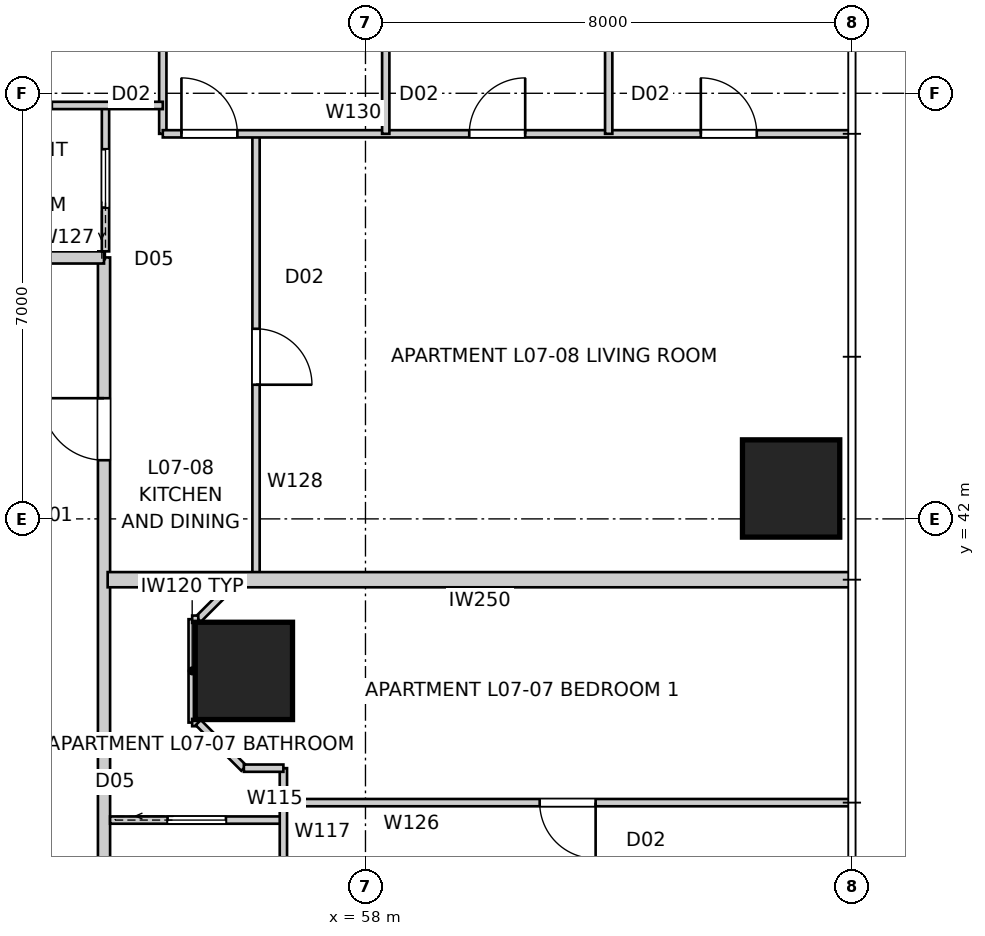
"""IFC4 building model, lengths in metres.
Left out: names, types, materials, properties, quantities, classifications, styles, units other than length and angle.
Written with IfcOpenShell. Run it as: python <this file> out.ifc"""

import sys

from ifc_helpers import new_model, si_unit, direction, frame, frame_2d, origin, origin_2d, place, context, subcontext, project, spatial, rectangle, extrude, element, fill, save


model = new_model("IFC4")
c1 = context("Model", 3, precision=1e-05, world=origin(), true_north=direction((0.0, 1.0)))
c2 = subcontext(c1, "Body", "Model", "MODEL_VIEW")
j1 = project(units=[si_unit("LENGTHUNIT", "METRE"), si_unit("PLANEANGLEUNIT", "RADIAN")], contexts=[c1])
p1 = place(None, origin())
s1 = spatial("IfcSite", under=j1, at=p1, CompositionType="ELEMENT")
p2 = place(p1, origin())
s2 = spatial("IfcBuilding", under=s1, at=p2, CompositionType="ELEMENT")
p3 = place(p2, frame((0.0, 0.0, 28.6)))
s3 = spatial("IfcBuildingStorey", under=s2, at=p3, CompositionType="ELEMENT", Elevation=28.6)
for number, where, z_axis, x_axis in (
    (1, (65.0, 42.5, 0.0), (0.0, 0.0, 1.0), (1.0, 0.0, 0.0)),
    (2, (56.0, 39.5, 0.0), (0.0, 0.0, 1.0), (1.0, 0.0, 0.0)),
):
    element("IfcColumn", number, at=place(p3, frame(where, z_axis=z_axis, x_axis=x_axis)), inside=s3, PredefinedType="COLUMN", context=c2, shape_type="SweptSolid", body=[
        extrude(rectangle(XDim=1.6, YDim=1.6, at=origin_2d()), origin(), (0.0, 0.0, 1.0), 3.4),
    ])
p4 = place(p3, frame((53.7, 13.7, 0.0), z_axis=(0.0, 0.0, 1.0), x_axis=(0.0, 1.0, 0.0)))
e3 = element("IfcWall", 3, at=p4, inside=s3, PredefinedType="PARTITIONING", context=c2, shape_type="SweptSolid", body=[
    extrude(rectangle(XDim=32.6, YDim=0.2, at=frame_2d((16.3, 0.0))), origin(), (0.0, 0.0, 1.0), 3.25),
])
p5 = place(p4, frame((2.315, 0.0, 0.0)))
e4 = element("IfcOpeningElement", 4, at=p5, cuts=e3, PredefinedType="OPENING", context=c2, shape_type="SweptSolid", body=[
    extrude(rectangle(XDim=1.02, YDim=2.34, at=frame_2d((0.51, 1.17))), frame((0.0, 0.11, 0.0), z_axis=(0.0, -1.0, 0.0), x_axis=(1.0, 0.0, 0.0)), (0.0, 0.0, 1.0), 0.22),
])
p6 = place(p4, frame((29.265, 0.0, 0.0)))
e5 = element("IfcOpeningElement", 5, at=p6, cuts=e3, PredefinedType="OPENING", context=c2, shape_type="SweptSolid", body=[
    extrude(rectangle(XDim=1.02, YDim=2.34, at=frame_2d((0.51, 1.17))), frame((0.0, 0.11, 0.0), z_axis=(0.0, -1.0, 0.0), x_axis=(1.0, 0.0, 0.0)), (0.0, 0.0, 1.0), 0.22),
])
p7 = place(p4, frame((20.646, 0.0, 0.0)))
e6 = element("IfcOpeningElement", 6, at=p7, cuts=e3, PredefinedType="OPENING", context=c2, shape_type="SweptSolid", body=[
    extrude(rectangle(XDim=1.02, YDim=2.34, at=frame_2d((0.51, 1.17))), frame((0.0, 0.11, 0.0), z_axis=(0.0, -1.0, 0.0), x_axis=(1.0, 0.0, 0.0)), (0.0, 0.0, 1.0), 0.22),
])
p8 = place(p4, frame((13.626, 0.0, 0.0)))
e7 = element("IfcOpeningElement", 7, at=p8, cuts=e3, PredefinedType="OPENING", context=c2, shape_type="SweptSolid", body=[
    extrude(rectangle(XDim=1.02, YDim=2.34, at=frame_2d((0.51, 1.17))), frame((0.0, 0.11, 0.0), z_axis=(0.0, -1.0, 0.0), x_axis=(1.0, 0.0, 0.0)), (0.0, 0.0, 1.0), 0.22),
])
p9 = place(p3, frame((53.7, 46.3, 0.0), z_axis=(0.0, 0.0, 1.0), x_axis=(-1.0, 0.0, 0.0)))
e8 = element("IfcWall", 8, at=p9, inside=s3, PredefinedType="PARTITIONING", context=c2, shape_type="SweptSolid", body=[
    extrude(rectangle(XDim=4.458, YDim=0.2, at=frame_2d((2.229, 0.0))), origin(), (0.0, 0.0, 1.0), 3.25),
])
p10 = place(p3, frame((66.0, 41.0, 0.0), z_axis=(0.0, 0.0, 1.0), x_axis=(-1.0, 0.0, 0.0)))
e9 = element("IfcWall", 9, at=p10, inside=s3, PredefinedType="PARTITIONING", context=c2, shape_type="SweptSolid", body=[
    extrude(rectangle(XDim=12.24, YDim=0.25, at=frame_2d((6.12, 0.0))), origin(), (0.0, 0.0, 1.0), 3.25),
])
p11 = place(p3, frame((53.8, 37.046, 0.0), z_axis=(0.0, 0.0, 1.0), x_axis=(1.0, 0.0, 0.0)))
e10 = element("IfcWall", 10, at=p11, inside=s3, PredefinedType="PARTITIONING", context=c2, shape_type="SweptSolid", body=[
    extrude(rectangle(XDim=2.85, YDim=0.12, at=frame_2d((1.425, 0.0))), origin(), (0.0, 0.0, 1.0), 3.25),
])
p12 = place(p11, frame((0.945, 0.0, 0.0)))
e11 = element("IfcOpeningElement", 11, at=p12, cuts=e10, PredefinedType="OPENING", context=c2, shape_type="SweptSolid", body=[
    extrude(rectangle(XDim=0.96, YDim=2.1, at=frame_2d((0.48, 1.05))), frame((0.0, 0.07, 0.0), z_axis=(0.0, -1.0, 0.0), x_axis=(1.0, 0.0, 0.0)), (0.0, 0.0, 1.0), 0.14),
])
p13 = place(p3, frame((56.65, 37.9, 0.0), z_axis=(0.0, 0.0, 1.0), x_axis=(0.0, -1.0, 0.0)))
e12 = element("IfcWall", 12, at=p13, inside=s3, PredefinedType="PARTITIONING", context=c2, shape_type="SweptSolid", body=[
    extrude(rectangle(XDim=5.234, YDim=0.12, at=frame_2d((2.617, 0.0))), origin(), (0.0, 0.0, 1.0), 2.55),
])
p14 = place(p13, frame((2.109, 0.0, 0.0)))
e13 = element("IfcOpeningElement", 13, at=p14, cuts=e12, PredefinedType="OPENING", context=c2, shape_type="SweptSolid", body=[
    extrude(rectangle(XDim=0.92, YDim=2.34, at=frame_2d((0.46, 1.17))), frame((0.0, 0.07, 0.0), z_axis=(0.0, -1.0, 0.0), x_axis=(1.0, 0.0, 0.0)), (0.0, 0.0, 1.0), 0.14),
])
p15 = place(p3, frame((55.9, 41.0, 0.0), z_axis=(0.0, 0.0, 1.0), x_axis=(-0.707106781187, -0.707106781187, 0.0)))
e14 = element("IfcWall", 14, at=p15, inside=s3, PredefinedType="PARTITIONING", context=c2, shape_type="SweptSolid", body=[
    extrude(rectangle(XDim=0.919, YDim=0.12, at=frame_2d((0.459, 0.0))), origin(), (0.0, 0.0, 1.0), 3.25),
])
p16 = place(p3, frame((55.15, 40.35, 0.0), z_axis=(0.0, 0.0, 1.0), x_axis=(0.0, -1.0, 0.0)))
e15 = element("IfcWall", 15, at=p16, inside=s3, PredefinedType="PARTITIONING", context=c2, shape_type="SweptSolid", body=[
    extrude(rectangle(XDim=1.7, YDim=0.12, at=frame_2d((0.85, 0.0))), origin(), (0.0, 0.0, 1.0), 3.25),
])
p17 = place(p3, frame((55.25, 38.65, 0.0), z_axis=(0.0, 0.0, 1.0), x_axis=(0.707106781187, -0.707106781187, 0.0)))
e16 = element("IfcWall", 16, at=p17, inside=s3, PredefinedType="PARTITIONING", context=c2, shape_type="SweptSolid", body=[
    extrude(rectangle(XDim=1.061, YDim=0.12, at=frame_2d((0.53, 0.0))), origin(), (0.0, 0.0, 1.0), 3.25),
])
p18 = place(p3, frame((56.0, 37.9, 0.0), z_axis=(0.0, 0.0, 1.0), x_axis=(1.0, 0.0, 0.0)))
e17 = element("IfcWall", 17, at=p18, inside=s3, PredefinedType="PARTITIONING", context=c2, shape_type="SweptSolid", body=[
    extrude(rectangle(XDim=0.65, YDim=0.12, at=frame_2d((0.325, 0.0))), origin(), (0.0, 0.0, 1.0), 3.25),
])
p19 = place(p3, frame((65.96, 37.333, 0.0), z_axis=(0.0, 0.0, 1.0), x_axis=(-1.0, 0.0, 0.0)))
e18 = element("IfcWall", 18, at=p19, inside=s3, PredefinedType="PARTITIONING", context=c2, shape_type="SweptSolid", body=[
    extrude(rectangle(XDim=9.31, YDim=0.12, at=frame_2d((4.655, 0.0))), origin(), (0.0, 0.0, 1.0), 3.25),
])
p20 = place(p19, frame((4.175, 0.0, 0.0)))
e19 = element("IfcOpeningElement", 19, at=p20, cuts=e18, PredefinedType="OPENING", context=c2, shape_type="SweptSolid", body=[
    extrude(rectangle(XDim=0.92, YDim=2.34, at=frame_2d((0.46, 1.17))), frame((0.0, 0.07, 0.0), z_axis=(0.0, -1.0, 0.0), x_axis=(1.0, 0.0, 0.0)), (0.0, 0.0, 1.0), 0.14),
])
p21 = place(p3, frame((53.724, 46.4, 0.0), z_axis=(0.0, 0.0, 1.0), x_axis=(0.0, 1.0, 0.0)))
e20 = element("IfcWall", 20, at=p21, inside=s3, PredefinedType="PARTITIONING", context=c2, shape_type="SweptSolid", body=[
    extrude(rectangle(XDim=2.4, YDim=0.12, at=frame_2d((1.2, 0.0))), origin(), (0.0, 0.0, 1.0), 3.25),
])
p22 = place(p21, frame((0.72, 0.0, 0.0)))
e21 = element("IfcOpeningElement", 21, at=p22, cuts=e20, PredefinedType="OPENING", context=c2, shape_type="SweptSolid", body=[
    extrude(rectangle(XDim=0.96, YDim=2.1, at=frame_2d((0.48, 1.05))), frame((0.0, 0.07, 0.0), z_axis=(0.0, -1.0, 0.0), x_axis=(1.0, 0.0, 0.0)), (0.0, 0.0, 1.0), 0.14),
])
p23 = place(p3, frame((56.2, 48.333, 0.0), z_axis=(0.0, 0.0, 1.0), x_axis=(0.0, -1.0, 0.0)))
e22 = element("IfcWall", 22, at=p23, inside=s3, PredefinedType="PARTITIONING", context=c2, shape_type="SweptSolid", body=[
    extrude(rectangle(XDim=7.333, YDim=0.12, at=frame_2d((3.667, 0.0))), origin(), (0.0, 0.0, 1.0), 3.25),
])
p24 = place(p23, frame((3.207, 0.0, 0.0)))
e23 = element("IfcOpeningElement", 23, at=p24, cuts=e22, PredefinedType="OPENING", context=c2, shape_type="SweptSolid", body=[
    extrude(rectangle(XDim=0.92, YDim=2.34, at=frame_2d((0.46, 1.17))), frame((0.0, 0.07, 0.0), z_axis=(0.0, -1.0, 0.0), x_axis=(1.0, 0.0, 0.0)), (0.0, 0.0, 1.0), 0.14),
])
p25 = place(p3, frame((54.667, 55.96, 0.0), z_axis=(0.0, 0.0, 1.0), x_axis=(0.0, -1.0, 0.0)))
e24 = element("IfcWall", 24, at=p25, inside=s3, PredefinedType="PARTITIONING", context=c2, shape_type="SweptSolid", body=[
    extrude(rectangle(XDim=7.627, YDim=0.12, at=frame_2d((3.813, 0.0))), origin(), (0.0, 0.0, 1.0), 2.638),
])
p26 = place(p3, frame((54.667, 48.333, 0.0), z_axis=(0.0, 0.0, 1.0), x_axis=(1.0, 0.0, 0.0)))
e25 = element("IfcWall", 25, at=p26, inside=s3, PredefinedType="PARTITIONING", context=c2, shape_type="SweptSolid", body=[
    extrude(rectangle(XDim=11.293, YDim=0.12, at=frame_2d((5.646, 0.0))), origin(), (0.0, 0.0, 1.0), 3.25),
])
p27 = place(p26, frame((0.307, 0.0, 0.0)))
e26 = element("IfcOpeningElement", 26, at=p27, cuts=e25, PredefinedType="OPENING", context=c2, shape_type="SweptSolid", body=[
    extrude(rectangle(XDim=0.92, YDim=2.34, at=frame_2d((0.46, 1.17))), frame((0.0, 0.07, 0.0), z_axis=(0.0, -1.0, 0.0), x_axis=(1.0, 0.0, 0.0)), (0.0, 0.0, 1.0), 0.14),
])
p28 = place(p26, frame((8.848, 0.0, 0.0)))
e27 = element("IfcOpeningElement", 27, at=p28, cuts=e25, PredefinedType="OPENING", context=c2, shape_type="SweptSolid", body=[
    extrude(rectangle(XDim=0.92, YDim=2.34, at=frame_2d((0.46, 1.17))), frame((0.0, 0.07, 0.0), z_axis=(0.0, -1.0, 0.0), x_axis=(1.0, 0.0, 0.0)), (0.0, 0.0, 1.0), 0.14),
])
p29 = place(p26, frame((5.04, 0.0, 0.0)))
e28 = element("IfcOpeningElement", 28, at=p29, cuts=e25, PredefinedType="OPENING", context=c2, shape_type="SweptSolid", body=[
    extrude(rectangle(XDim=0.92, YDim=2.34, at=frame_2d((0.46, 1.17))), frame((0.0, 0.07, 0.0), z_axis=(0.0, -1.0, 0.0), x_axis=(1.0, 0.0, 0.0)), (0.0, 0.0, 1.0), 0.14),
])
p30 = place(p3, frame((25.333, 48.8, 0.0), z_axis=(0.0, 0.0, 1.0), x_axis=(1.0, 0.0, 0.0)))
e29 = element("IfcWall", 29, at=p30, inside=s3, PredefinedType="PARTITIONING", context=c2, shape_type="SweptSolid", body=[
    extrude(rectangle(XDim=29.333, YDim=0.12, at=frame_2d((14.667, 0.0))), origin(), (0.0, 0.0, 1.0), 3.25),
])
p31 = place(p30, frame((19.707, 0.0, 0.0)))
e30 = element("IfcOpeningElement", 30, at=p31, cuts=e29, PredefinedType="OPENING", context=c2, shape_type="SweptSolid", body=[
    extrude(rectangle(XDim=0.92, YDim=2.34, at=frame_2d((0.46, 1.17))), frame((0.0, 0.07, 0.0), z_axis=(0.0, -1.0, 0.0), x_axis=(1.0, 0.0, 0.0)), (0.0, 0.0, 1.0), 0.14),
])
p32 = place(p30, frame((23.348, 0.0, 0.0)))
e31 = element("IfcOpeningElement", 31, at=p32, cuts=e29, PredefinedType="OPENING", context=c2, shape_type="SweptSolid", body=[
    extrude(rectangle(XDim=0.92, YDim=2.34, at=frame_2d((0.46, 1.17))), frame((0.0, 0.07, 0.0), z_axis=(0.0, -1.0, 0.0), x_axis=(1.0, 0.0, 0.0)), (0.0, 0.0, 1.0), 0.14),
])
p33 = place(p30, frame((16.884, 0.0, 0.0)))
e32 = element("IfcOpeningElement", 32, at=p33, cuts=e29, PredefinedType="OPENING", context=c2, shape_type="SweptSolid", body=[
    extrude(rectangle(XDim=0.92, YDim=2.34, at=frame_2d((0.46, 1.17))), frame((0.0, 0.07, 0.0), z_axis=(0.0, -1.0, 0.0), x_axis=(1.0, 0.0, 0.0)), (0.0, 0.0, 1.0), 0.14),
])
p34 = place(p30, frame((26.549, 0.0, 0.0)))
e33 = element("IfcOpeningElement", 33, at=p34, cuts=e29, PredefinedType="OPENING", context=c2, shape_type="SweptSolid", body=[
    extrude(rectangle(XDim=0.96, YDim=2.1, at=frame_2d((0.48, 1.05))), frame((0.0, 0.07, 0.0), z_axis=(0.0, -1.0, 0.0), x_axis=(1.0, 0.0, 0.0)), (0.0, 0.0, 1.0), 0.14),
])
p35 = place(p30, frame((1.844, 0.0, 0.0)))
e34 = element("IfcOpeningElement", 34, at=p35, cuts=e29, PredefinedType="OPENING", context=c2, shape_type="SweptSolid", body=[
    extrude(rectangle(XDim=0.96, YDim=2.1, at=frame_2d((0.48, 1.05))), frame((0.0, 0.07, 0.0), z_axis=(0.0, -1.0, 0.0), x_axis=(1.0, 0.0, 0.0)), (0.0, 0.0, 1.0), 0.14),
])
p36 = place(p30, frame((8.484, 0.0, 0.0)))
e35 = element("IfcOpeningElement", 35, at=p36, cuts=e29, PredefinedType="OPENING", context=c2, shape_type="SweptSolid", body=[
    extrude(rectangle(XDim=0.96, YDim=2.1, at=frame_2d((0.48, 1.05))), frame((0.0, 0.07, 0.0), z_axis=(0.0, -1.0, 0.0), x_axis=(1.0, 0.0, 0.0)), (0.0, 0.0, 1.0), 0.14),
])
p37 = place(p3, frame((58.333, 48.333, 0.0), z_axis=(0.0, 0.0, 1.0), x_axis=(0.0, 1.0, 0.0)))
e36 = element("IfcWall", 36, at=p37, inside=s3, PredefinedType="PARTITIONING", context=c2, shape_type="SweptSolid", body=[
    extrude(rectangle(XDim=7.627, YDim=0.12, at=frame_2d((3.813, 0.0))), origin(), (0.0, 0.0, 1.0), 3.25),
])
p38 = place(p3, frame((62.0, 51.96, 0.0), z_axis=(0.0, 0.0, 1.0), x_axis=(0.0, -1.0, 0.0)))
e37 = element("IfcWall", 37, at=p38, inside=s3, PredefinedType="PARTITIONING", context=c2, shape_type="SweptSolid", body=[
    extrude(rectangle(XDim=3.627, YDim=0.12, at=frame_2d((1.813, 0.0))), origin(), (0.0, 0.0, 1.0), 3.25),
])
for number, where, z_axis, x_axis in (
    (38, (55.15, 40.35, 0.0), (0.0, 0.0, 1.0), (1.0, 0.0, 0.0)),
    (39, (55.15, 38.65, 0.0), (0.0, 0.0, 1.0), (1.0, 0.0, 0.0)),
):
    element("IfcWall", number, at=place(p3, frame(where, z_axis=z_axis, x_axis=x_axis)), inside=s3, PredefinedType="PARTITIONING", context=c2, shape_type="SweptSolid", body=[
        extrude(rectangle(XDim=0.1, YDim=0.12, at=frame_2d((0.05, 0.0))), origin(), (0.0, 0.0, 1.0), 3.25),
    ])
p39 = place(p6, origin())
e40 = element("IfcDoor", 40, at=p39, inside=s3, OperationType="SINGLE_SWING_RIGHT", PredefinedType="DOOR", context=c2, shape_type="SweptSolid", body=[
    extrude(rectangle(XDim=1.02, YDim=2.34, at=frame_2d((0.51, 1.17))), frame((0.0, 0.025, 0.0), z_axis=(0.0, -1.0, 0.0), x_axis=(1.0, 0.0, 0.0)), (0.0, 0.0, 1.0), 0.05),
])
fill(e5, e40)
p40 = place(p24, origin())
e41 = element("IfcDoor", 41, at=p40, inside=s3, OperationType="SINGLE_SWING_RIGHT", PredefinedType="DOOR", context=c2, shape_type="SweptSolid", body=[
    extrude(rectangle(XDim=0.92, YDim=2.34, at=frame_2d((0.46, 1.17))), frame((0.0, 0.025, 0.0), z_axis=(0.0, -1.0, 0.0), x_axis=(1.0, 0.0, 0.0)), (0.0, 0.0, 1.0), 0.05),
])
fill(e23, e41)
p41 = place(p22, origin())
e42 = element("IfcDoor", 42, at=p41, inside=s3, OperationType="SLIDING_TO_LEFT", PredefinedType="DOOR", context=c2, shape_type="SweptSolid", body=[
    extrude(rectangle(XDim=0.96, YDim=2.1, at=frame_2d((0.48, 1.05))), frame((0.0, 0.025, 0.0), z_axis=(0.0, -1.0, 0.0), x_axis=(1.0, 0.0, 0.0)), (0.0, 0.0, 1.0), 0.05),
])
fill(e21, e42)
p42 = place(p27, origin())
e43 = element("IfcDoor", 43, at=p42, inside=s3, OperationType="SINGLE_SWING_LEFT", PredefinedType="DOOR", context=c2, shape_type="SweptSolid", body=[
    extrude(rectangle(XDim=0.92, YDim=2.34, at=frame_2d((0.46, 1.17))), frame((0.0, 0.025, 0.0), z_axis=(0.0, -1.0, 0.0), x_axis=(1.0, 0.0, 0.0)), (0.0, 0.0, 1.0), 0.05),
])
fill(e26, e43)
p43 = place(p12, origin())
e44 = element("IfcDoor", 44, at=p43, inside=s3, OperationType="SLIDING_TO_LEFT", PredefinedType="DOOR", context=c2, shape_type="SweptSolid", body=[
    extrude(rectangle(XDim=0.96, YDim=2.1, at=frame_2d((0.48, 1.05))), frame((0.0, 0.025, 0.0), z_axis=(0.0, -1.0, 0.0), x_axis=(1.0, 0.0, 0.0)), (0.0, 0.0, 1.0), 0.05),
])
fill(e11, e44)
p44 = place(p28, origin())
e45 = element("IfcDoor", 45, at=p44, inside=s3, OperationType="SINGLE_SWING_LEFT", PredefinedType="DOOR", context=c2, shape_type="SweptSolid", body=[
    extrude(rectangle(XDim=0.92, YDim=2.34, at=frame_2d((0.46, 1.17))), frame((0.0, 0.025, 0.0), z_axis=(0.0, -1.0, 0.0), x_axis=(1.0, 0.0, 0.0)), (0.0, 0.0, 1.0), 0.05),
])
fill(e27, e45)
p45 = place(p29, origin())
e46 = element("IfcDoor", 46, at=p45, inside=s3, OperationType="SINGLE_SWING_RIGHT", PredefinedType="DOOR", context=c2, shape_type="SweptSolid", body=[
    extrude(rectangle(XDim=0.92, YDim=2.34, at=frame_2d((0.46, 1.17))), frame((0.0, 0.025, 0.0), z_axis=(0.0, -1.0, 0.0), x_axis=(1.0, 0.0, 0.0)), (0.0, 0.0, 1.0), 0.05),
])
fill(e28, e46)
p46 = place(p20, origin())
e47 = element("IfcDoor", 47, at=p46, inside=s3, OperationType="SINGLE_SWING_LEFT", PredefinedType="DOOR", context=c2, shape_type="SweptSolid", body=[
    extrude(rectangle(XDim=0.92, YDim=2.34, at=frame_2d((0.46, 1.17))), frame((0.0, 0.025, 0.0), z_axis=(0.0, -1.0, 0.0), x_axis=(1.0, 0.0, 0.0)), (0.0, 0.0, 1.0), 0.05),
])
fill(e19, e47)
save(model, sys.argv[1])
